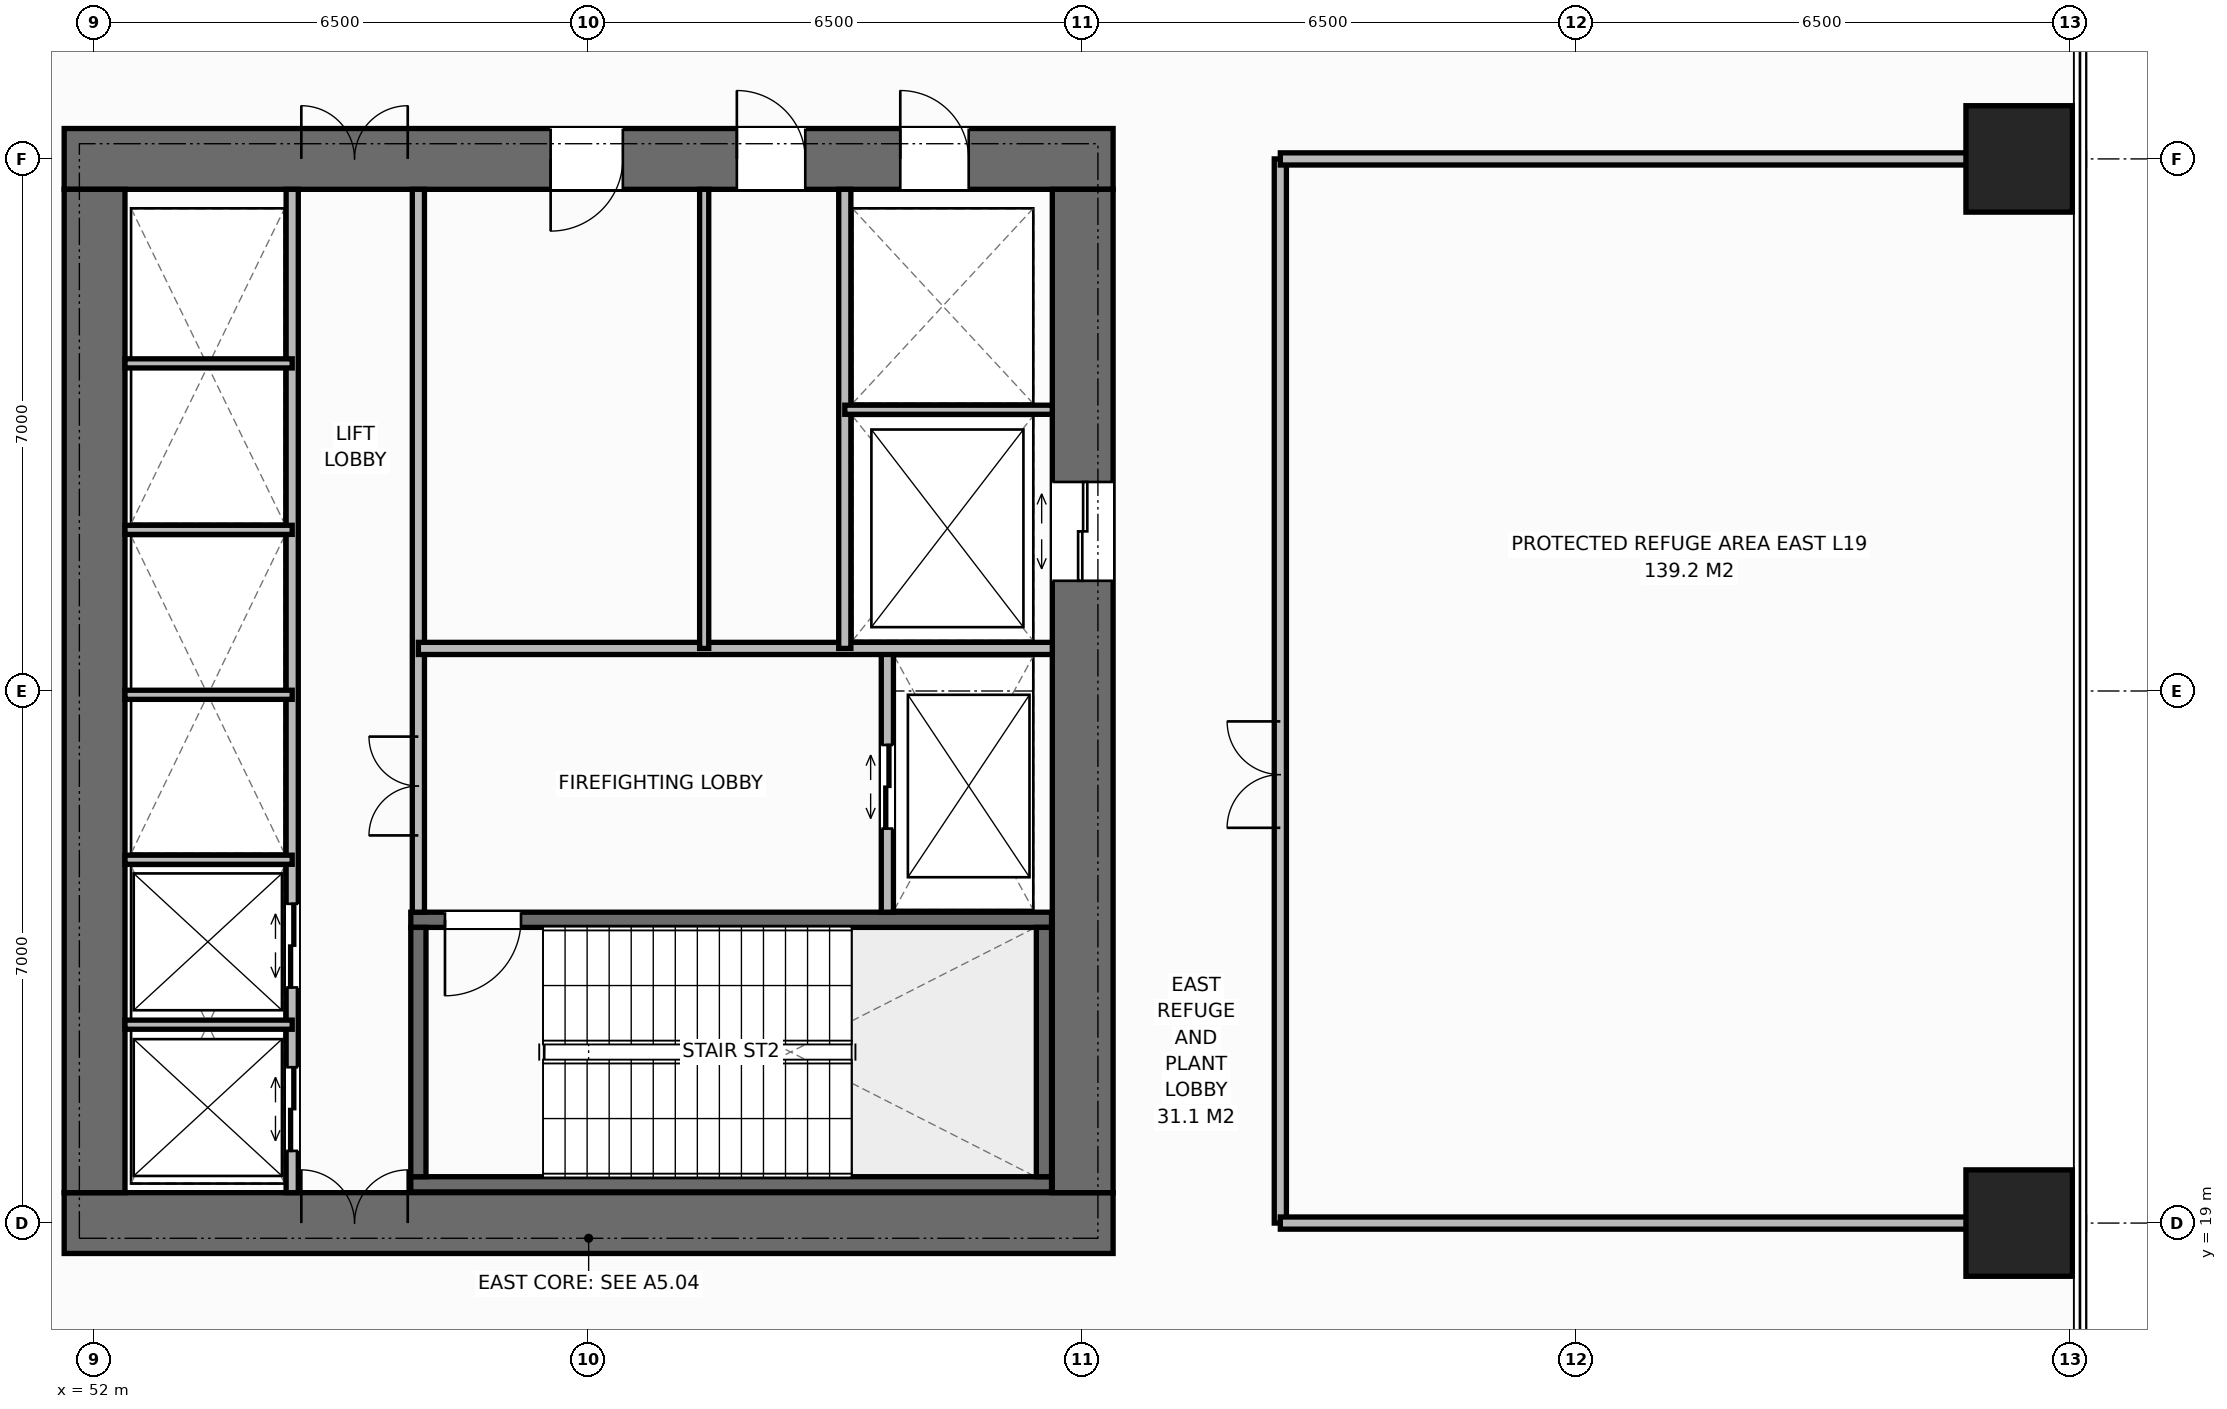
"""IFC4 building model, lengths in metres.
Left out: names, types, materials, properties, quantities, classifications, styles, units other than length and angle.
Written with IfcOpenShell. Run it as: python <this file> out.ifc"""

import sys

from ifc_helpers import new_model, si_unit, direction, frame, frame_2d, origin, origin_2d, place, context, subcontext, project, spatial, rectangle, extrude, element, fill, save


model = new_model("IFC4")
c1 = context("Model", 3, precision=1e-05, world=origin(), true_north=direction((0.0, 1.0)))
c2 = subcontext(c1, "Body", "Model", "MODEL_VIEW")
j1 = project(units=[si_unit("LENGTHUNIT", "METRE"), si_unit("PLANEANGLEUNIT", "RADIAN")], contexts=[c1])
p1 = place(None, origin())
s1 = spatial("IfcSite", under=j1, at=p1, CompositionType="ELEMENT")
p2 = place(p1, origin())
s2 = spatial("IfcBuilding", under=s1, at=p2, CompositionType="ELEMENT")
p3 = place(p2, frame((0.0, 0.0, 81.0)))
s3 = spatial("IfcBuildingStorey", under=s2, at=p3, CompositionType="ELEMENT", Elevation=81.0)
p4 = place(p3, frame((51.6, 19.0, 0.0), z_axis=(0.0, 0.0, 1.0), x_axis=(1.0, 0.0, 0.0)))
e1 = element("IfcWall", 1, at=p4, inside=s3, PredefinedType="SHEAR", context=c2, shape_type="SweptSolid", body=[
    extrude(rectangle(XDim=13.8, YDim=0.8, at=frame_2d((6.9, 0.0))), origin(), (0.0, 0.0, 1.0), 5.0),
])
p5 = place(p4, frame((3.12, 0.0, 0.0)))
e2 = element("IfcOpeningElement", 2, at=p5, cuts=e1, PredefinedType="OPENING", context=c2, shape_type="SweptSolid", body=[
    extrude(rectangle(XDim=1.4, YDim=2.2, at=frame_2d((0.7, 1.1))), frame((0.0, 0.41, 0.0), z_axis=(0.0, -1.0, 0.0), x_axis=(1.0, 0.0, 0.0)), (0.0, 0.0, 1.0), 0.82),
])
p6 = place(p3, frame((51.6, 33.0, 0.0), z_axis=(0.0, 0.0, 1.0), x_axis=(1.0, 0.0, 0.0)))
e3 = element("IfcWall", 3, at=p6, inside=s3, PredefinedType="SHEAR", context=c2, shape_type="SweptSolid", body=[
    extrude(rectangle(XDim=13.8, YDim=0.8, at=frame_2d((6.9, 0.0))), origin(), (0.0, 0.0, 1.0), 5.0),
])
p7 = place(p6, frame((3.12, 0.0, 0.0)))
e4 = element("IfcOpeningElement", 4, at=p7, cuts=e3, PredefinedType="OPENING", context=c2, shape_type="SweptSolid", body=[
    extrude(rectangle(XDim=1.4, YDim=2.2, at=frame_2d((0.7, 1.1))), frame((0.0, 0.41, 0.0), z_axis=(0.0, -1.0, 0.0), x_axis=(1.0, 0.0, 0.0)), (0.0, 0.0, 1.0), 0.82),
])
p8 = place(p6, frame((11.0, 0.0, 0.0)))
e5 = element("IfcOpeningElement", 5, at=p8, cuts=e3, PredefinedType="OPENING", context=c2, shape_type="SweptSolid", body=[
    extrude(rectangle(XDim=0.9, YDim=2.15, at=frame_2d((0.45, 1.075))), frame((0.0, 0.41, 0.0), z_axis=(0.0, -1.0, 0.0), x_axis=(1.0, 0.0, 0.0)), (0.0, 0.0, 1.0), 0.82),
])
p9 = place(p6, frame((6.4, 0.0, 0.0)))
e6 = element("IfcOpeningElement", 6, at=p9, cuts=e3, PredefinedType="OPENING", context=c2, shape_type="SweptSolid", body=[
    extrude(rectangle(XDim=0.95, YDim=2.15, at=frame_2d((0.475, 1.075))), frame((0.0, 0.41, 0.0), z_axis=(0.0, -1.0, 0.0), x_axis=(1.0, 0.0, 0.0)), (0.0, 0.0, 1.0), 0.82),
])
p10 = place(p6, frame((8.85, 0.0, 0.0)))
e7 = element("IfcOpeningElement", 7, at=p10, cuts=e3, PredefinedType="OPENING", context=c2, shape_type="SweptSolid", body=[
    extrude(rectangle(XDim=0.9, YDim=2.15, at=frame_2d((0.45, 1.075))), frame((0.0, 0.41, 0.0), z_axis=(0.0, -1.0, 0.0), x_axis=(1.0, 0.0, 0.0)), (0.0, 0.0, 1.0), 0.82),
])
p11 = place(p3, frame((52.0, 19.4, 0.0), z_axis=(0.0, 0.0, 1.0), x_axis=(0.0, 1.0, 0.0)))
e8 = element("IfcWall", 8, at=p11, inside=s3, PredefinedType="SHEAR", context=c2, shape_type="SweptSolid", body=[
    extrude(rectangle(XDim=13.2, YDim=0.8, at=frame_2d((6.6, 0.0))), origin(), (0.0, 0.0, 1.0), 5.0),
])
p12 = place(p3, frame((65.0, 19.4, 0.0), z_axis=(0.0, 0.0, 1.0), x_axis=(0.0, 1.0, 0.0)))
e9 = element("IfcWall", 9, at=p12, inside=s3, PredefinedType="SHEAR", context=c2, shape_type="SweptSolid", body=[
    extrude(rectangle(XDim=13.2, YDim=0.8, at=frame_2d((6.6, 0.0))), origin(), (0.0, 0.0, 1.0), 5.0),
])
p13 = place(p12, frame((8.05, 0.0, 0.0)))
e10 = element("IfcOpeningElement", 10, at=p13, cuts=e9, PredefinedType="OPENING", context=c2, shape_type="SweptSolid", body=[
    extrude(rectangle(XDim=1.3, YDim=2.2, at=frame_2d((0.65, 1.1))), frame((0.0, 0.41, 0.0), z_axis=(0.0, -1.0, 0.0), x_axis=(1.0, 0.0, 0.0)), (0.0, 0.0, 1.0), 0.82),
])
p14 = place(p3, frame((56.16, 19.51, 0.0), z_axis=(0.0, 0.0, 1.0), x_axis=(1.0, 0.0, 0.0)))
e11 = element("IfcWall", 11, at=p14, inside=s3, PredefinedType="SHEAR", context=c2, shape_type="SweptSolid", body=[
    extrude(rectangle(XDim=8.43, YDim=0.2, at=frame_2d((4.215, 0.0))), origin(), (0.0, 0.0, 1.0), 5.0),
])
p15 = place(p3, frame((56.16, 22.99, 0.0), z_axis=(0.0, 0.0, 1.0), x_axis=(1.0, 0.0, 0.0)))
e12 = element("IfcWall", 12, at=p15, inside=s3, PredefinedType="SHEAR", context=c2, shape_type="SweptSolid", body=[
    extrude(rectangle(XDim=8.43, YDim=0.2, at=frame_2d((4.215, 0.0))), origin(), (0.0, 0.0, 1.0), 5.0),
])
p16 = place(p15, frame((0.45, 0.0, 0.0)))
e13 = element("IfcOpeningElement", 13, at=p16, cuts=e12, PredefinedType="OPENING", context=c2, shape_type="SweptSolid", body=[
    extrude(rectangle(XDim=1.0, YDim=2.15, at=frame_2d((0.5, 1.075))), frame((0.0, 0.11, 0.0), z_axis=(0.0, -1.0, 0.0), x_axis=(1.0, 0.0, 0.0)), (0.0, 0.0, 1.0), 0.22),
])
for number, where, z_axis, x_axis in (
    (14, (56.26, 19.61, 0.0), (0.0, 0.0, 1.0), (0.0, 1.0, 0.0)),
    (15, (64.49, 19.61, 0.0), (0.0, 0.0, 1.0), (0.0, 1.0, 0.0)),
):
    element("IfcWall", number, at=place(p3, frame(where, z_axis=z_axis, x_axis=x_axis)), inside=s3, PredefinedType="SHEAR", context=c2, shape_type="SweptSolid", body=[
        extrude(rectangle(XDim=3.28, YDim=0.2, at=frame_2d((1.64, 0.0))), origin(), (0.0, 0.0, 1.0), 5.0),
    ])
for number, where, z_axis, x_axis in (
    (16, (77.32, 19.0, 0.0), (0.0, 0.0, 1.0), (1.0, 0.0, 0.0)),
    (17, (77.32, 33.0, 0.0), (0.0, 0.0, 1.0), (1.0, 0.0, 0.0)),
):
    element("IfcColumn", number, at=place(p3, frame(where, z_axis=z_axis, x_axis=x_axis)), inside=s3, PredefinedType="COLUMN", context=c2, shape_type="SweptSolid", body=[
        extrude(rectangle(XDim=1.4, YDim=1.4, at=origin_2d()), origin(), (0.0, 0.0, 1.0), 5.0),
    ])
p17 = place(p3, frame((54.6, 19.4, 0.0), z_axis=(0.0, 0.0, 1.0), x_axis=(0.0, 1.0, 0.0)))
e18 = element("IfcWall", 18, at=p17, inside=s3, PredefinedType="STANDARD", context=c2, shape_type="SweptSolid", body=[
    extrude(rectangle(XDim=13.2, YDim=0.16, at=frame_2d((6.6, 0.0))), origin(), (0.0, 0.0, 1.0), 4.765),
])
p18 = place(p17, frame((0.55, 0.0, 0.0)))
e19 = element("IfcOpeningElement", 19, at=p18, cuts=e18, PredefinedType="OPENING", context=c2, shape_type="SweptSolid", body=[
    extrude(rectangle(XDim=1.1, YDim=2.2, at=frame_2d((0.55, 1.1))), frame((0.0, 0.09, 0.0), z_axis=(0.0, -1.0, 0.0), x_axis=(1.0, 0.0, 0.0)), (0.0, 0.0, 1.0), 0.18),
])
p19 = place(p17, frame((2.7, 0.0, 0.0)))
e20 = element("IfcOpeningElement", 20, at=p19, cuts=e18, PredefinedType="OPENING", context=c2, shape_type="SweptSolid", body=[
    extrude(rectangle(XDim=1.1, YDim=2.2, at=frame_2d((0.55, 1.1))), frame((0.0, 0.09, 0.0), z_axis=(0.0, -1.0, 0.0), x_axis=(1.0, 0.0, 0.0)), (0.0, 0.0, 1.0), 0.18),
])
p20 = place(p3, frame((56.26, 23.09, 0.0), z_axis=(0.0, 0.0, 1.0), x_axis=(0.0, 1.0, 0.0)))
e21 = element("IfcWall", 21, at=p20, inside=s3, PredefinedType="STANDARD", context=c2, shape_type="SweptSolid", body=[
    extrude(rectangle(XDim=9.51, YDim=0.16, at=frame_2d((4.755, 0.0))), origin(), (0.0, 0.0, 1.0), 4.765),
])
p21 = place(p20, frame((1.01, 0.0, 0.0)))
e22 = element("IfcOpeningElement", 22, at=p21, cuts=e21, PredefinedType="OPENING", context=c2, shape_type="SweptSolid", body=[
    extrude(rectangle(XDim=1.3, YDim=2.2, at=frame_2d((0.65, 1.1))), frame((0.0, 0.09, 0.0), z_axis=(0.0, -1.0, 0.0), x_axis=(1.0, 0.0, 0.0)), (0.0, 0.0, 1.0), 0.18),
])
for number, where, z_axis, x_axis in (
    (23, (52.4, 21.61, 0.0), (0.0, 0.0, 1.0), (1.0, 0.0, 0.0)),
    (24, (52.4, 23.78, 0.0), (0.0, 0.0, 1.0), (1.0, 0.0, 0.0)),
    (25, (52.4, 25.95, 0.0), (0.0, 0.0, 1.0), (1.0, 0.0, 0.0)),
    (26, (52.4, 28.12, 0.0), (0.0, 0.0, 1.0), (1.0, 0.0, 0.0)),
    (27, (52.4, 30.31, 0.0), (0.0, 0.0, 1.0), (1.0, 0.0, 0.0)),
):
    element("IfcWall", number, at=place(p3, frame(where, z_axis=z_axis, x_axis=x_axis)), inside=s3, PredefinedType="PARTITIONING", context=c2, shape_type="SweptSolid", body=[
        extrude(rectangle(XDim=2.2, YDim=0.12, at=frame_2d((1.1, 0.0))), origin(), (0.0, 0.0, 1.0), 4.765),
    ])
p22 = place(p3, frame((62.43, 23.09, 0.0), z_axis=(0.0, 0.0, 1.0), x_axis=(0.0, 1.0, 0.0)))
e28 = element("IfcWall", 28, at=p22, inside=s3, PredefinedType="STANDARD", context=c2, shape_type="SweptSolid", body=[
    extrude(rectangle(XDim=3.47, YDim=0.16, at=frame_2d((1.735, 0.0))), origin(), (0.0, 0.0, 1.0), 4.765),
])
p23 = place(p22, frame((1.1, 0.0, 0.0)))
e29 = element("IfcOpeningElement", 29, at=p23, cuts=e28, PredefinedType="OPENING", context=c2, shape_type="SweptSolid", body=[
    extrude(rectangle(XDim=1.1, YDim=2.2, at=frame_2d((0.55, 1.1))), frame((0.0, 0.09, 0.0), z_axis=(0.0, -1.0, 0.0), x_axis=(1.0, 0.0, 0.0)), (0.0, 0.0, 1.0), 0.18),
])
p24 = place(p3, frame((56.26, 26.56, 0.0), z_axis=(0.0, 0.0, 1.0), x_axis=(1.0, 0.0, 0.0)))
e30 = element("IfcWall", 30, at=p24, inside=s3, PredefinedType="STANDARD", context=c2, shape_type="SweptSolid", body=[
    extrude(rectangle(XDim=8.34, YDim=0.16, at=frame_2d((4.17, 0.0))), origin(), (0.0, 0.0, 1.0), 4.765),
])
p25 = place(p3, frame((61.87, 26.56, 0.0), z_axis=(0.0, 0.0, 1.0), x_axis=(0.0, 1.0, 0.0)))
e31 = element("IfcWall", 31, at=p25, inside=s3, PredefinedType="STANDARD", context=c2, shape_type="SweptSolid", body=[
    extrude(rectangle(XDim=6.04, YDim=0.16, at=frame_2d((3.02, 0.0))), origin(), (0.0, 0.0, 1.0), 4.765),
])
p26 = place(p3, frame((61.87, 29.7, 0.0), z_axis=(0.0, 0.0, 1.0), x_axis=(1.0, 0.0, 0.0)))
e32 = element("IfcWall", 32, at=p26, inside=s3, PredefinedType="PARTITIONING", context=c2, shape_type="SweptSolid", body=[
    extrude(rectangle(XDim=2.73, YDim=0.12, at=frame_2d((1.365, 0.0))), origin(), (0.0, 0.0, 1.0), 4.765),
])
p27 = place(p3, frame((60.02, 26.56, 0.0), z_axis=(0.0, 0.0, 1.0), x_axis=(0.0, 1.0, 0.0)))
e33 = element("IfcWall", 33, at=p27, inside=s3, PredefinedType="PARTITIONING", context=c2, shape_type="SweptSolid", body=[
    extrude(rectangle(XDim=6.04, YDim=0.12, at=frame_2d((3.02, 0.0))), origin(), (0.0, 0.0, 1.0), 4.765),
])
p28 = place(p3, frame((67.6, 19.0, 0.0), z_axis=(0.0, 0.0, 1.0), x_axis=(0.0, 1.0, 0.0)))
e34 = element("IfcWall", 34, at=p28, inside=s3, PredefinedType="STANDARD", context=c2, shape_type="SweptSolid", body=[
    extrude(rectangle(XDim=14.0, YDim=0.16, at=frame_2d((7.0, 0.0))), origin(), (0.0, 0.0, 1.0), 4.765),
])
p29 = place(p28, frame((5.2, 0.0, 0.0)))
e35 = element("IfcOpeningElement", 35, at=p29, cuts=e34, PredefinedType="OPENING", context=c2, shape_type="SweptSolid", body=[
    extrude(rectangle(XDim=1.4, YDim=2.2, at=frame_2d((0.7, 1.1))), frame((0.0, 0.09, 0.0), z_axis=(0.0, -1.0, 0.0), x_axis=(1.0, 0.0, 0.0)), (0.0, 0.0, 1.0), 0.18),
])
for number, where, z_axis, x_axis in (
    (36, (67.6, 19.0, 0.0), (0.0, 0.0, 1.0), (1.0, 0.0, 0.0)),
    (37, (67.6, 33.0, 0.0), (0.0, 0.0, 1.0), (1.0, 0.0, 0.0)),
):
    element("IfcWall", number, at=place(p3, frame(where, z_axis=z_axis, x_axis=x_axis)), inside=s3, PredefinedType="STANDARD", context=c2, shape_type="SweptSolid", body=[
        extrude(rectangle(XDim=10.58, YDim=0.16, at=frame_2d((5.29, 0.0))), origin(), (0.0, 0.0, 1.0), 3.245),
    ])
p30 = place(p5, origin())
e38 = element("IfcDoor", 38, at=p30, inside=s3, OperationType="DOUBLE_DOOR_SINGLE_SWING", PredefinedType="DOOR", context=c2, shape_type="SweptSolid", body=[
    extrude(rectangle(XDim=1.4, YDim=2.2, at=frame_2d((0.7, 1.1))), frame((0.0, 0.125, 0.0), z_axis=(0.0, -1.0, 0.0), x_axis=(1.0, 0.0, 0.0)), (0.0, 0.0, 1.0), 0.05),
])
fill(e2, e38)
p31 = place(p7, origin())
e39 = element("IfcDoor", 39, at=p31, inside=s3, OperationType="DOUBLE_DOOR_SINGLE_SWING", PredefinedType="DOOR", context=c2, shape_type="SweptSolid", body=[
    extrude(rectangle(XDim=1.4, YDim=2.2, at=frame_2d((0.7, 1.1))), frame((0.0, -0.075, 0.0), z_axis=(0.0, -1.0, 0.0), x_axis=(1.0, 0.0, 0.0)), (0.0, 0.0, 1.0), 0.05),
])
fill(e4, e39)
p32 = place(p18, origin())
e40 = element("IfcDoor", 40, at=p32, inside=s3, OperationType="DOUBLE_DOOR_SLIDING", PredefinedType="DOOR", context=c2, shape_type="SweptSolid", body=[
    extrude(rectangle(XDim=1.1, YDim=2.2, at=frame_2d((0.55, 1.1))), frame((0.0, 0.025, 0.0), z_axis=(0.0, -1.0, 0.0), x_axis=(1.0, 0.0, 0.0)), (0.0, 0.0, 1.0), 0.05),
])
fill(e19, e40)
p33 = place(p19, origin())
e41 = element("IfcDoor", 41, at=p33, inside=s3, OperationType="DOUBLE_DOOR_SLIDING", PredefinedType="DOOR", context=c2, shape_type="SweptSolid", body=[
    extrude(rectangle(XDim=1.1, YDim=2.2, at=frame_2d((0.55, 1.1))), frame((0.0, 0.025, 0.0), z_axis=(0.0, -1.0, 0.0), x_axis=(1.0, 0.0, 0.0)), (0.0, 0.0, 1.0), 0.05),
])
fill(e20, e41)
p34 = place(p16, origin())
e42 = element("IfcDoor", 42, at=p34, inside=s3, OperationType="SINGLE_SWING_RIGHT", PredefinedType="DOOR", context=c2, shape_type="SweptSolid", body=[
    extrude(rectangle(XDim=1.0, YDim=2.15, at=frame_2d((0.5, 1.075))), frame((0.0, 0.025, 0.0), z_axis=(0.0, -1.0, 0.0), x_axis=(1.0, 0.0, 0.0)), (0.0, 0.0, 1.0), 0.05),
])
fill(e13, e42)
p35 = place(p23, origin())
e43 = element("IfcDoor", 43, at=p35, inside=s3, OperationType="DOUBLE_DOOR_SLIDING", PredefinedType="DOOR", context=c2, shape_type="SweptSolid", body=[
    extrude(rectangle(XDim=1.1, YDim=2.2, at=frame_2d((0.55, 1.1))), frame((0.0, 0.025, 0.0), z_axis=(0.0, -1.0, 0.0), x_axis=(1.0, 0.0, 0.0)), (0.0, 0.0, 1.0), 0.05),
])
fill(e29, e43)
p36 = place(p21, origin())
e44 = element("IfcDoor", 44, at=p36, inside=s3, OperationType="DOUBLE_DOOR_SINGLE_SWING", PredefinedType="DOOR", context=c2, shape_type="SweptSolid", body=[
    extrude(rectangle(XDim=1.3, YDim=2.2, at=frame_2d((0.65, 1.1))), frame((0.0, 0.025, 0.0), z_axis=(0.0, -1.0, 0.0), x_axis=(1.0, 0.0, 0.0)), (0.0, 0.0, 1.0), 0.05),
])
fill(e22, e44)
p37 = place(p13, origin())
e45 = element("IfcDoor", 45, at=p37, inside=s3, OperationType="DOUBLE_DOOR_SLIDING", PredefinedType="DOOR", context=c2, shape_type="SweptSolid", body=[
    extrude(rectangle(XDim=1.3, YDim=2.2, at=frame_2d((0.65, 1.1))), frame((0.0, 0.025, 0.0), z_axis=(0.0, -1.0, 0.0), x_axis=(1.0, 0.0, 0.0)), (0.0, 0.0, 1.0), 0.05),
])
fill(e10, e45)
p38 = place(p8, origin())
e46 = element("IfcDoor", 46, at=p38, inside=s3, OperationType="SINGLE_SWING_LEFT", PredefinedType="DOOR", context=c2, shape_type="SweptSolid", body=[
    extrude(rectangle(XDim=0.9, YDim=2.15, at=frame_2d((0.45, 1.075))), frame((0.0, -0.075, 0.0), z_axis=(0.0, -1.0, 0.0), x_axis=(1.0, 0.0, 0.0)), (0.0, 0.0, 1.0), 0.05),
])
fill(e5, e46)
p39 = place(p9, origin())
e47 = element("IfcDoor", 47, at=p39, inside=s3, OperationType="SINGLE_SWING_RIGHT", PredefinedType="DOOR", context=c2, shape_type="SweptSolid", body=[
    extrude(rectangle(XDim=0.95, YDim=2.15, at=frame_2d((0.475, 1.075))), frame((0.0, -0.075, 0.0), z_axis=(0.0, -1.0, 0.0), x_axis=(1.0, 0.0, 0.0)), (0.0, 0.0, 1.0), 0.05),
])
fill(e6, e47)
p40 = place(p10, origin())
e48 = element("IfcDoor", 48, at=p40, inside=s3, OperationType="SINGLE_SWING_LEFT", PredefinedType="DOOR", context=c2, shape_type="SweptSolid", body=[
    extrude(rectangle(XDim=0.9, YDim=2.15, at=frame_2d((0.45, 1.075))), frame((0.0, -0.075, 0.0), z_axis=(0.0, -1.0, 0.0), x_axis=(1.0, 0.0, 0.0)), (0.0, 0.0, 1.0), 0.05),
])
fill(e7, e48)
p41 = place(p29, origin())
e49 = element("IfcDoor", 49, at=p41, inside=s3, OperationType="DOUBLE_DOOR_SINGLE_SWING", PredefinedType="DOOR", context=c2, shape_type="SweptSolid", body=[
    extrude(rectangle(XDim=1.4, YDim=2.2, at=frame_2d((0.7, 1.1))), frame((0.0, 0.025, 0.0), z_axis=(0.0, -1.0, 0.0), x_axis=(1.0, 0.0, 0.0)), (0.0, 0.0, 1.0), 0.05),
])
fill(e35, e49)
save(model, sys.argv[1])
